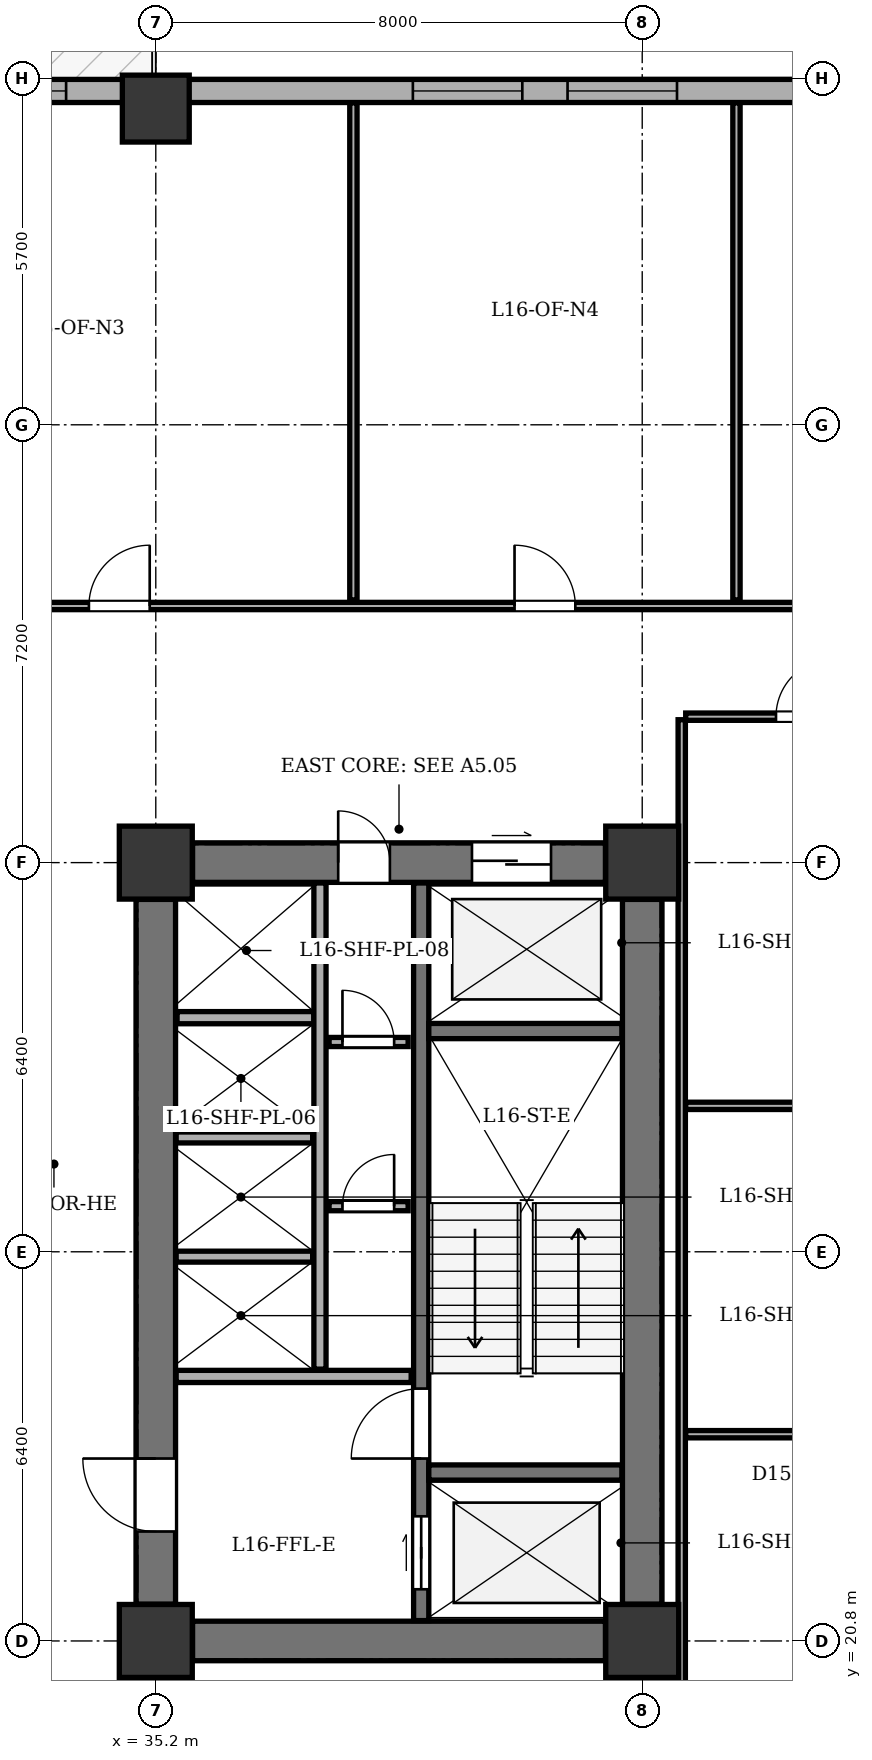
"""IFC4 building model, lengths in metres.
Left out: names, types, materials, properties, quantities, classifications, styles, units other than length and angle.
Written with IfcOpenShell. Run it as: python <this file> out.ifc"""

import sys

from ifc_helpers import new_model, si_unit, direction, frame, frame_2d, origin, origin_2d, place, context, subcontext, project, spatial, rectangle, extrude, element, fill, save


model = new_model("IFC4")
c1 = context("Model", 3, precision=1e-05, world=origin(), true_north=direction((0.0, 1.0)))
c2 = subcontext(c1, "Body", "Model", "MODEL_VIEW")
j1 = project(units=[si_unit("LENGTHUNIT", "METRE"), si_unit("PLANEANGLEUNIT", "RADIAN")], contexts=[c1])
p1 = place(None, origin())
s1 = spatial("IfcSite", under=j1, at=p1, CompositionType="ELEMENT")
p2 = place(p1, origin())
s2 = spatial("IfcBuilding", under=s1, at=p2, CompositionType="ELEMENT")
p3 = place(p2, frame((0.0, 0.0, 67.2)))
s3 = spatial("IfcBuildingStorey", under=s2, at=p3, CompositionType="ELEMENT", Elevation=67.2)
for number, where, z_axis, x_axis in (
    (1, (35.2, 20.8, 0.0), (0.0, 0.0, 1.0), (1.0, 0.0, 0.0)),
    (2, (43.2, 20.8, 0.0), (0.0, 0.0, 1.0), (1.0, 0.0, 0.0)),
    (3, (35.2, 33.6, 0.0), (0.0, 0.0, 1.0), (1.0, 0.0, 0.0)),
    (4, (43.2, 33.6, 0.0), (0.0, 0.0, 1.0), (1.0, 0.0, 0.0)),
):
    element("IfcColumn", number, at=place(p3, frame(where, z_axis=z_axis, x_axis=x_axis)), inside=s3, PredefinedType="COLUMN", context=c2, shape_type="SweptSolid", body=[
        extrude(rectangle(XDim=1.2, YDim=1.2, at=origin_2d()), origin(), (0.0, 0.0, 1.0), 3.9),
    ])
p4 = place(p3, frame((35.2, 46.0, 0.0), z_axis=(0.0, 0.0, 1.0), x_axis=(1.0, 0.0, 0.0)))
e5 = element("IfcColumn", 5, at=p4, inside=s3, PredefinedType="COLUMN", context=c2, shape_type="SweptSolid", body=[
    extrude(rectangle(XDim=1.1, YDim=1.1, at=origin_2d()), origin(), (0.0, 0.0, 1.0), 3.9),
])
p5 = place(p3, frame((15.7, 46.29, 0.0), z_axis=(0.0, 0.0, 1.0), x_axis=(1.0, 0.0, 0.0)))
e6 = element("IfcWall", 6, at=p5, inside=s3, PredefinedType="STANDARD", context=c2, shape_type="SweptSolid", body=[
    extrude(rectangle(XDim=35.0, YDim=0.38, at=frame_2d((17.5, 0.0))), origin(), (0.0, 0.0, 1.0), 2.835),
])
p6 = place(p5, frame((8.0, 0.0, 0.0)))
e7 = element("IfcOpeningElement", 7, at=p6, cuts=e6, PredefinedType="OPENING", context=c2, shape_type="SweptSolid", body=[
    extrude(rectangle(XDim=1.0, YDim=2.02, at=frame_2d((0.5, 1.01))), frame((0.0, 0.2, 0.0), z_axis=(0.0, -1.0, 0.0), x_axis=(1.0, 0.0, 0.0)), (0.0, 0.0, 1.0), 0.4),
])
p7 = place(p5, frame((1.675, 0.0, 0.8)))
e8 = element("IfcOpeningElement", 8, at=p7, cuts=e6, PredefinedType="OPENING", context=c2, shape_type="SweptSolid", body=[
    extrude(rectangle(XDim=1.8, YDim=1.9, at=frame_2d((0.9, 0.95))), frame((0.0, 0.2, 0.0), z_axis=(0.0, -1.0, 0.0), x_axis=(1.0, 0.0, 0.0)), (0.0, 0.0, 1.0), 0.4),
])
p8 = place(p5, frame((16.225, 0.0, 0.8)))
e9 = element("IfcOpeningElement", 9, at=p8, cuts=e6, PredefinedType="OPENING", context=c2, shape_type="SweptSolid", body=[
    extrude(rectangle(XDim=1.8, YDim=1.9, at=frame_2d((0.9, 0.95))), frame((0.0, 0.2, 0.0), z_axis=(0.0, -1.0, 0.0), x_axis=(1.0, 0.0, 0.0)), (0.0, 0.0, 1.0), 0.4),
])
p9 = place(p5, frame((23.728, 0.0, 0.8)))
e10 = element("IfcOpeningElement", 10, at=p9, cuts=e6, PredefinedType="OPENING", context=c2, shape_type="SweptSolid", body=[
    extrude(rectangle(XDim=1.8, YDim=1.9, at=frame_2d((0.9, 0.95))), frame((0.0, 0.2, 0.0), z_axis=(0.0, -1.0, 0.0), x_axis=(1.0, 0.0, 0.0)), (0.0, 0.0, 1.0), 0.4),
])
p10 = place(p5, frame((26.272, 0.0, 0.8)))
e11 = element("IfcOpeningElement", 11, at=p10, cuts=e6, PredefinedType="OPENING", context=c2, shape_type="SweptSolid", body=[
    extrude(rectangle(XDim=1.8, YDim=1.9, at=frame_2d((0.9, 0.95))), frame((0.0, 0.2, 0.0), z_axis=(0.0, -1.0, 0.0), x_axis=(1.0, 0.0, 0.0)), (0.0, 0.0, 1.0), 0.4),
])
p11 = place(p5, frame((30.95, 0.0, 0.8)))
e12 = element("IfcOpeningElement", 12, at=p11, cuts=e6, PredefinedType="OPENING", context=c2, shape_type="SweptSolid", body=[
    extrude(rectangle(XDim=1.8, YDim=1.9, at=frame_2d((0.9, 0.95))), frame((0.0, 0.2, 0.0), z_axis=(0.0, -1.0, 0.0), x_axis=(1.0, 0.0, 0.0)), (0.0, 0.0, 1.0), 0.4),
])
p12 = place(p3, frame((43.2, 21.405, 0.0), z_axis=(0.0, 0.0, 1.0), x_axis=(0.0, 1.0, 0.0)))
e13 = element("IfcWall", 13, at=p12, inside=s3, PredefinedType="SHEAR", context=c2, shape_type="SweptSolid", body=[
    extrude(rectangle(XDim=11.59, YDim=0.65, at=frame_2d((5.795, 0.0))), origin(), (0.0, 0.0, 1.0), 3.45),
])
p13 = place(p3, frame((35.805, 20.8, 0.0), z_axis=(0.0, 0.0, 1.0), x_axis=(1.0, 0.0, 0.0)))
e14 = element("IfcWall", 14, at=p13, inside=s3, PredefinedType="SHEAR", context=c2, shape_type="SweptSolid", body=[
    extrude(rectangle(XDim=6.79, YDim=0.65, at=frame_2d((3.395, 0.0))), origin(), (0.0, 0.0, 1.0), 3.45),
])
p14 = place(p3, frame((35.805, 33.6, 0.0), z_axis=(0.0, 0.0, 1.0), x_axis=(1.0, 0.0, 0.0)))
e15 = element("IfcWall", 15, at=p14, inside=s3, PredefinedType="SHEAR", context=c2, shape_type="SweptSolid", body=[
    extrude(rectangle(XDim=6.79, YDim=0.65, at=frame_2d((3.395, 0.0))), origin(), (0.0, 0.0, 1.0), 3.45),
])
p15 = place(p14, frame((4.595, 0.0, 0.0)))
e16 = element("IfcOpeningElement", 16, at=p15, cuts=e15, PredefinedType="OPENING", context=c2, shape_type="SweptSolid", body=[
    extrude(rectangle(XDim=1.3, YDim=2.15, at=frame_2d((0.65, 1.075))), frame((0.0, 0.335, 0.0), z_axis=(0.0, -1.0, 0.0), x_axis=(1.0, 0.0, 0.0)), (0.0, 0.0, 1.0), 0.67),
])
p16 = place(p14, frame((2.395, 0.0, 0.0)))
e17 = element("IfcOpeningElement", 17, at=p16, cuts=e15, PredefinedType="OPENING", context=c2, shape_type="SweptSolid", body=[
    extrude(rectangle(XDim=0.85, YDim=2.02, at=frame_2d((0.425, 1.01))), frame((0.0, 0.335, 0.0), z_axis=(0.0, -1.0, 0.0), x_axis=(1.0, 0.0, 0.0)), (0.0, 0.0, 1.0), 0.67),
])
p17 = place(p3, frame((35.2, 21.405, 0.0), z_axis=(0.0, 0.0, 1.0), x_axis=(0.0, 1.0, 0.0)))
e18 = element("IfcWall", 18, at=p17, inside=s3, PredefinedType="SHEAR", context=c2, shape_type="SweptSolid", body=[
    extrude(rectangle(XDim=11.59, YDim=0.65, at=frame_2d((5.795, 0.0))), origin(), (0.0, 0.0, 1.0), 3.45),
])
p18 = place(p17, frame((1.195, 0.0, 0.0)))
e19 = element("IfcOpeningElement", 19, at=p18, cuts=e18, PredefinedType="OPENING", context=c2, shape_type="SweptSolid", body=[
    extrude(rectangle(XDim=1.2, YDim=2.15, at=frame_2d((0.6, 1.075))), frame((0.0, 0.335, 0.0), z_axis=(0.0, -1.0, 0.0), x_axis=(1.0, 0.0, 0.0)), (0.0, 0.0, 1.0), 0.67),
])
p19 = place(p3, frame((39.565, 21.135, 0.0), z_axis=(0.0, 0.0, 1.0), x_axis=(0.0, 1.0, 0.0)))
e20 = element("IfcWall", 20, at=p19, inside=s3, PredefinedType="SHEAR", context=c2, shape_type="SweptSolid", body=[
    extrude(rectangle(XDim=12.13, YDim=0.25, at=frame_2d((6.065, 0.0))), origin(), (0.0, 0.0, 1.0), 3.45),
])
p20 = place(p19, frame((0.515, 0.0, 0.0)))
e21 = element("IfcOpeningElement", 21, at=p20, cuts=e20, PredefinedType="OPENING", context=c2, shape_type="SweptSolid", body=[
    extrude(rectangle(XDim=1.2, YDim=2.15, at=frame_2d((0.6, 1.075))), frame((0.0, 0.135, 0.0), z_axis=(0.0, -1.0, 0.0), x_axis=(1.0, 0.0, 0.0)), (0.0, 0.0, 1.0), 0.27),
])
p21 = place(p19, frame((2.665, 0.0, 0.0)))
e22 = element("IfcOpeningElement", 22, at=p21, cuts=e20, PredefinedType="OPENING", context=c2, shape_type="SweptSolid", body=[
    extrude(rectangle(XDim=1.15, YDim=2.15, at=frame_2d((0.575, 1.075))), frame((0.0, 0.135, 0.0), z_axis=(0.0, -1.0, 0.0), x_axis=(1.0, 0.0, 0.0)), (0.0, 0.0, 1.0), 0.27),
])
for number, where, z_axis, x_axis in (
    (23, (39.69, 23.57, 0.0), (0.0, 0.0, 1.0), (1.0, 0.0, 0.0)),
    (24, (39.69, 30.83, 0.0), (0.0, 0.0, 1.0), (1.0, 0.0, 0.0)),
):
    element("IfcWall", number, at=place(p3, frame(where, z_axis=z_axis, x_axis=x_axis)), inside=s3, PredefinedType="SHEAR", context=c2, shape_type="SweptSolid", body=[
        extrude(rectangle(XDim=3.175, YDim=0.25, at=frame_2d((1.587, 0.0))), origin(), (0.0, 0.0, 1.0), 3.45),
    ])
p22 = place(p3, frame((35.535, 25.15, 0.0), z_axis=(0.0, 0.0, 1.0), x_axis=(1.0, 0.0, 0.0)))
e25 = element("IfcWall", 25, at=p22, inside=s3, PredefinedType="SOLIDWALL", context=c2, shape_type="SweptSolid", body=[
    extrude(rectangle(XDim=3.865, YDim=0.2, at=frame_2d((1.933, 0.0))), origin(), (0.0, 0.0, 1.0), 3.45),
])
p23 = place(p3, frame((35.55, 31.05, 0.0), z_axis=(0.0, 0.0, 1.0), x_axis=(1.0, 0.0, 0.0)))
e26 = element("IfcWall", 26, at=p23, inside=s3, PredefinedType="SOLIDWALL", context=c2, shape_type="SweptSolid", body=[
    extrude(rectangle(XDim=2.25, YDim=0.2, at=frame_2d((1.125, 0.0))), origin(), (0.0, 0.0, 1.0), 3.45),
])
p24 = place(p3, frame((37.9, 25.27, 0.0), z_axis=(0.0, 0.0, 1.0), x_axis=(0.0, 1.0, 0.0)))
e27 = element("IfcWall", 27, at=p24, inside=s3, PredefinedType="SOLIDWALL", context=c2, shape_type="SweptSolid", body=[
    extrude(rectangle(XDim=7.995, YDim=0.2, at=frame_2d((3.998, 0.0))), origin(), (0.0, 0.0, 1.0), 3.45),
])
for number, where, z_axis, x_axis in (
    (28, (35.535, 27.12, 0.0), (0.0, 0.0, 1.0), (1.0, 0.0, 0.0)),
    (29, (35.535, 29.08, 0.0), (0.0, 0.0, 1.0), (1.0, 0.0, 0.0)),
):
    element("IfcWall", number, at=place(p3, frame(where, z_axis=z_axis, x_axis=x_axis)), inside=s3, PredefinedType="PARTITIONING", context=c2, shape_type="SweptSolid", body=[
        extrude(rectangle(XDim=2.245, YDim=0.18, at=frame_2d((1.123, 0.0))), origin(), (0.0, 0.0, 1.0), 3.45),
    ])
p25 = place(p3, frame((38.05, 27.95, 0.0), z_axis=(0.0, 0.0, 1.0), x_axis=(1.0, 0.0, 0.0)))
e30 = element("IfcWall", 30, at=p25, inside=s3, PredefinedType="PARTITIONING", context=c2, shape_type="SweptSolid", body=[
    extrude(rectangle(XDim=1.3, YDim=0.15, at=frame_2d((0.65, 0.0))), origin(), (0.0, 0.0, 1.0), 3.45),
])
p26 = place(p25, frame((0.22, 0.0, 0.0)))
e31 = element("IfcOpeningElement", 31, at=p26, cuts=e30, PredefinedType="OPENING", context=c2, shape_type="SweptSolid", body=[
    extrude(rectangle(XDim=0.85, YDim=2.02, at=frame_2d((0.425, 1.01))), frame((0.0, 0.085, 0.0), z_axis=(0.0, -1.0, 0.0), x_axis=(1.0, 0.0, 0.0)), (0.0, 0.0, 1.0), 0.17),
])
p27 = place(p3, frame((38.05, 30.65, 0.0), z_axis=(0.0, 0.0, 1.0), x_axis=(1.0, 0.0, 0.0)))
e32 = element("IfcWall", 32, at=p27, inside=s3, PredefinedType="PARTITIONING", context=c2, shape_type="SweptSolid", body=[
    extrude(rectangle(XDim=1.3, YDim=0.15, at=frame_2d((0.65, 0.0))), origin(), (0.0, 0.0, 1.0), 3.45),
])
p28 = place(p27, frame((0.22, 0.0, 0.0)))
e33 = element("IfcOpeningElement", 33, at=p28, cuts=e32, PredefinedType="OPENING", context=c2, shape_type="SweptSolid", body=[
    extrude(rectangle(XDim=0.85, YDim=2.02, at=frame_2d((0.425, 1.01))), frame((0.0, 0.085, 0.0), z_axis=(0.0, -1.0, 0.0), x_axis=(1.0, 0.0, 0.0)), (0.0, 0.0, 1.0), 0.17),
])
p29 = place(p3, frame((15.7, 37.82, 0.0), z_axis=(0.0, 0.0, 1.0), x_axis=(1.0, 0.0, 0.0)))
e34 = element("IfcWall", 34, at=p29, inside=s3, PredefinedType="PARTITIONING", context=c2, shape_type="SweptSolid", body=[
    extrude(rectangle(XDim=35.0, YDim=0.12, at=frame_2d((17.5, 0.0))), origin(), (0.0, 0.0, 1.0), 3.45),
])
p30 = place(p29, frame((3.175, 0.0, 0.0)))
e35 = element("IfcOpeningElement", 35, at=p30, cuts=e34, PredefinedType="OPENING", context=c2, shape_type="SweptSolid", body=[
    extrude(rectangle(XDim=1.0, YDim=2.1, at=frame_2d((0.5, 1.05))), frame((0.0, 0.07, 0.0), z_axis=(0.0, -1.0, 0.0), x_axis=(1.0, 0.0, 0.0)), (0.0, 0.0, 1.0), 0.14),
])
p31 = place(p29, frame((10.7, 0.0, 0.0)))
e36 = element("IfcOpeningElement", 36, at=p31, cuts=e34, PredefinedType="OPENING", context=c2, shape_type="SweptSolid", body=[
    extrude(rectangle(XDim=1.0, YDim=2.1, at=frame_2d((0.5, 1.05))), frame((0.0, 0.07, 0.0), z_axis=(0.0, -1.0, 0.0), x_axis=(1.0, 0.0, 0.0)), (0.0, 0.0, 1.0), 0.14),
])
p32 = place(p29, frame((18.4, 0.0, 0.0)))
e37 = element("IfcOpeningElement", 37, at=p32, cuts=e34, PredefinedType="OPENING", context=c2, shape_type="SweptSolid", body=[
    extrude(rectangle(XDim=1.0, YDim=2.1, at=frame_2d((0.5, 1.05))), frame((0.0, 0.07, 0.0), z_axis=(0.0, -1.0, 0.0), x_axis=(1.0, 0.0, 0.0)), (0.0, 0.0, 1.0), 0.14),
])
p33 = place(p29, frame((25.4, 0.0, 0.0)))
e38 = element("IfcOpeningElement", 38, at=p33, cuts=e34, PredefinedType="OPENING", context=c2, shape_type="SweptSolid", body=[
    extrude(rectangle(XDim=1.0, YDim=2.1, at=frame_2d((0.5, 1.05))), frame((0.0, 0.07, 0.0), z_axis=(0.0, -1.0, 0.0), x_axis=(1.0, 0.0, 0.0)), (0.0, 0.0, 1.0), 0.14),
])
p34 = place(p29, frame((31.525, 0.0, 0.0)))
e39 = element("IfcOpeningElement", 39, at=p34, cuts=e34, PredefinedType="OPENING", context=c2, shape_type="SweptSolid", body=[
    extrude(rectangle(XDim=1.0, YDim=2.1, at=frame_2d((0.5, 1.05))), frame((0.0, 0.07, 0.0), z_axis=(0.0, -1.0, 0.0), x_axis=(1.0, 0.0, 0.0)), (0.0, 0.0, 1.0), 0.14),
])
p35 = place(p3, frame((38.45, 37.92, 0.0), z_axis=(0.0, 0.0, 1.0), x_axis=(0.0, 1.0, 0.0)))
e40 = element("IfcWall", 40, at=p35, inside=s3, PredefinedType="PARTITIONING", context=c2, shape_type="SweptSolid", body=[
    extrude(rectangle(XDim=8.175, YDim=0.12, at=frame_2d((4.087, 0.0))), origin(), (0.0, 0.0, 1.0), 2.885),
])
p36 = place(p3, frame((44.75, 37.92, 0.0), z_axis=(0.0, 0.0, 1.0), x_axis=(0.0, 1.0, 0.0)))
e41 = element("IfcWall", 41, at=p36, inside=s3, PredefinedType="PARTITIONING", context=c2, shape_type="SweptSolid", body=[
    extrude(rectangle(XDim=8.175, YDim=0.12, at=frame_2d((4.087, 0.0))), origin(), (0.0, 0.0, 1.0), 3.45),
])
p37 = place(p3, frame((43.85, 18.45, 0.0), z_axis=(0.0, 0.0, 1.0), x_axis=(0.0, 1.0, 0.0)))
e42 = element("IfcWall", 42, at=p37, inside=s3, PredefinedType="PARTITIONING", context=c2, shape_type="SweptSolid", body=[
    extrude(rectangle(XDim=17.5, YDim=0.12, at=frame_2d((8.75, 0.0))), origin(), (0.0, 0.0, 1.0), 3.45),
])
p38 = place(p3, frame((43.915, 36.0, 0.0), z_axis=(0.0, 0.0, 1.0), x_axis=(1.0, 0.0, 0.0)))
e43 = element("IfcWall", 43, at=p38, inside=s3, PredefinedType="PARTITIONING", context=c2, shape_type="SweptSolid", body=[
    extrude(rectangle(XDim=11.38, YDim=0.12, at=frame_2d((5.69, 0.0))), origin(), (0.0, 0.0, 1.0), 3.45),
])
p39 = place(p38, frame((1.485, 0.0, 0.0)))
e44 = element("IfcOpeningElement", 44, at=p39, cuts=e43, PredefinedType="OPENING", context=c2, shape_type="SweptSolid", body=[
    extrude(rectangle(XDim=0.95, YDim=2.1, at=frame_2d((0.475, 1.05))), frame((0.0, 0.07, 0.0), z_axis=(0.0, -1.0, 0.0), x_axis=(1.0, 0.0, 0.0)), (0.0, 0.0, 1.0), 0.14),
])
p40 = place(p3, frame((43.915, 24.2, 0.0), z_axis=(0.0, 0.0, 1.0), x_axis=(1.0, 0.0, 0.0)))
e45 = element("IfcWall", 45, at=p40, inside=s3, PredefinedType="PARTITIONING", context=c2, shape_type="SweptSolid", body=[
    extrude(rectangle(XDim=11.38, YDim=0.12, at=frame_2d((5.69, 0.0))), origin(), (0.0, 0.0, 1.0), 3.45),
])
p41 = place(p40, frame((1.985, 0.0, 0.0)))
e46 = element("IfcOpeningElement", 46, at=p41, cuts=e45, PredefinedType="OPENING", context=c2, shape_type="SweptSolid", body=[
    extrude(rectangle(XDim=0.9, YDim=2.05, at=frame_2d((0.45, 1.025))), frame((0.0, 0.07, 0.0), z_axis=(0.0, -1.0, 0.0), x_axis=(1.0, 0.0, 0.0)), (0.0, 0.0, 1.0), 0.14),
])
p42 = place(p3, frame((43.915, 29.6, 0.0), z_axis=(0.0, 0.0, 1.0), x_axis=(1.0, 0.0, 0.0)))
e47 = element("IfcWall", 47, at=p42, inside=s3, PredefinedType="PARTITIONING", context=c2, shape_type="SweptSolid", body=[
    extrude(rectangle(XDim=11.38, YDim=0.12, at=frame_2d((5.69, 0.0))), origin(), (0.0, 0.0, 1.0), 2.885),
])
p43 = place(p42, frame((1.985, 0.0, 0.0)))
e48 = element("IfcOpeningElement", 48, at=p43, cuts=e47, PredefinedType="OPENING", context=c2, shape_type="SweptSolid", body=[
    extrude(rectangle(XDim=0.9, YDim=2.05, at=frame_2d((0.45, 1.025))), frame((0.0, 0.07, 0.0), z_axis=(0.0, -1.0, 0.0), x_axis=(1.0, 0.0, 0.0)), (0.0, 0.0, 1.0), 0.14),
])
p44 = place(p8, origin())
e49 = element("IfcWindow", 49, at=p44, inside=s3, PartitioningType="SINGLE_PANEL", PredefinedType="WINDOW", context=c2, shape_type="SweptSolid", body=[
    extrude(rectangle(XDim=1.8, YDim=1.9, at=frame_2d((0.9, 0.95))), frame((0.0, -0.01, 0.0), z_axis=(0.0, -1.0, 0.0), x_axis=(1.0, 0.0, 0.0)), (0.0, 0.0, 1.0), 0.06),
])
fill(e9, e49)
p45 = place(p9, origin())
e50 = element("IfcWindow", 50, at=p45, inside=s3, PartitioningType="SINGLE_PANEL", PredefinedType="WINDOW", context=c2, shape_type="SweptSolid", body=[
    extrude(rectangle(XDim=1.8, YDim=1.9, at=frame_2d((0.9, 0.95))), frame((0.0, -0.01, 0.0), z_axis=(0.0, -1.0, 0.0), x_axis=(1.0, 0.0, 0.0)), (0.0, 0.0, 1.0), 0.06),
])
fill(e10, e50)
p46 = place(p10, origin())
e51 = element("IfcWindow", 51, at=p46, inside=s3, PartitioningType="SINGLE_PANEL", PredefinedType="WINDOW", context=c2, shape_type="SweptSolid", body=[
    extrude(rectangle(XDim=1.8, YDim=1.9, at=frame_2d((0.9, 0.95))), frame((0.0, -0.01, 0.0), z_axis=(0.0, -1.0, 0.0), x_axis=(1.0, 0.0, 0.0)), (0.0, 0.0, 1.0), 0.06),
])
fill(e11, e51)
p47 = place(p15, origin())
e52 = element("IfcDoor", 52, at=p47, inside=s3, OperationType="DOUBLE_DOOR_SLIDING", PredefinedType="DOOR", context=c2, shape_type="SweptSolid", body=[
    extrude(rectangle(XDim=1.3, YDim=2.15, at=frame_2d((0.65, 1.075))), frame((0.0, 0.025, 0.0), z_axis=(0.0, -1.0, 0.0), x_axis=(1.0, 0.0, 0.0)), (0.0, 0.0, 1.0), 0.05),
])
fill(e16, e52)
p48 = place(p16, origin())
e53 = element("IfcDoor", 53, at=p48, inside=s3, OperationType="SINGLE_SWING_LEFT", PredefinedType="DOOR", context=c2, shape_type="SweptSolid", body=[
    extrude(rectangle(XDim=0.85, YDim=2.02, at=frame_2d((0.425, 1.01))), frame((0.0, 0.025, 0.0), z_axis=(0.0, -1.0, 0.0), x_axis=(1.0, 0.0, 0.0)), (0.0, 0.0, 1.0), 0.05),
])
fill(e17, e53)
p49 = place(p18, origin())
e54 = element("IfcDoor", 54, at=p49, inside=s3, OperationType="SINGLE_SWING_RIGHT", PredefinedType="DOOR", context=c2, shape_type="SweptSolid", body=[
    extrude(rectangle(XDim=1.2, YDim=2.15, at=frame_2d((0.6, 1.075))), frame((0.0, 0.025, 0.0), z_axis=(0.0, -1.0, 0.0), x_axis=(1.0, 0.0, 0.0)), (0.0, 0.0, 1.0), 0.05),
])
fill(e19, e54)
p50 = place(p20, origin())
e55 = element("IfcDoor", 55, at=p50, inside=s3, OperationType="DOUBLE_DOOR_SLIDING", PredefinedType="DOOR", context=c2, shape_type="SweptSolid", body=[
    extrude(rectangle(XDim=1.2, YDim=2.15, at=frame_2d((0.6, 1.075))), frame((0.0, 0.025, 0.0), z_axis=(0.0, -1.0, 0.0), x_axis=(1.0, 0.0, 0.0)), (0.0, 0.0, 1.0), 0.05),
])
fill(e21, e55)
p51 = place(p21, origin())
e56 = element("IfcDoor", 56, at=p51, inside=s3, OperationType="SINGLE_SWING_LEFT", PredefinedType="DOOR", context=c2, shape_type="SweptSolid", body=[
    extrude(rectangle(XDim=1.15, YDim=2.15, at=frame_2d((0.575, 1.075))), frame((0.0, 0.025, 0.0), z_axis=(0.0, -1.0, 0.0), x_axis=(1.0, 0.0, 0.0)), (0.0, 0.0, 1.0), 0.05),
])
fill(e22, e56)
p52 = place(p26, origin())
e57 = element("IfcDoor", 57, at=p52, inside=s3, OperationType="SINGLE_SWING_RIGHT", PredefinedType="DOOR", context=c2, shape_type="SweptSolid", body=[
    extrude(rectangle(XDim=0.85, YDim=2.02, at=frame_2d((0.425, 1.01))), frame((0.0, 0.025, 0.0), z_axis=(0.0, -1.0, 0.0), x_axis=(1.0, 0.0, 0.0)), (0.0, 0.0, 1.0), 0.05),
])
fill(e31, e57)
p53 = place(p28, origin())
e58 = element("IfcDoor", 58, at=p53, inside=s3, OperationType="SINGLE_SWING_LEFT", PredefinedType="DOOR", context=c2, shape_type="SweptSolid", body=[
    extrude(rectangle(XDim=0.85, YDim=2.02, at=frame_2d((0.425, 1.01))), frame((0.0, 0.025, 0.0), z_axis=(0.0, -1.0, 0.0), x_axis=(1.0, 0.0, 0.0)), (0.0, 0.0, 1.0), 0.05),
])
fill(e33, e58)
p54 = place(p32, origin())
e59 = element("IfcDoor", 59, at=p54, inside=s3, OperationType="SINGLE_SWING_RIGHT", PredefinedType="DOOR", context=c2, shape_type="SweptSolid", body=[
    extrude(rectangle(XDim=1.0, YDim=2.1, at=frame_2d((0.5, 1.05))), frame((0.0, 0.025, 0.0), z_axis=(0.0, -1.0, 0.0), x_axis=(1.0, 0.0, 0.0)), (0.0, 0.0, 1.0), 0.05),
])
fill(e37, e59)
p55 = place(p33, origin())
e60 = element("IfcDoor", 60, at=p55, inside=s3, OperationType="SINGLE_SWING_LEFT", PredefinedType="DOOR", context=c2, shape_type="SweptSolid", body=[
    extrude(rectangle(XDim=1.0, YDim=2.1, at=frame_2d((0.5, 1.05))), frame((0.0, 0.025, 0.0), z_axis=(0.0, -1.0, 0.0), x_axis=(1.0, 0.0, 0.0)), (0.0, 0.0, 1.0), 0.05),
])
fill(e38, e60)
p56 = place(p39, origin())
e61 = element("IfcDoor", 61, at=p56, inside=s3, OperationType="SINGLE_SWING_RIGHT", PredefinedType="DOOR", context=c2, shape_type="SweptSolid", body=[
    extrude(rectangle(XDim=0.95, YDim=2.1, at=frame_2d((0.475, 1.05))), frame((0.0, 0.025, 0.0), z_axis=(0.0, -1.0, 0.0), x_axis=(1.0, 0.0, 0.0)), (0.0, 0.0, 1.0), 0.05),
])
fill(e44, e61)
save(model, sys.argv[1])
